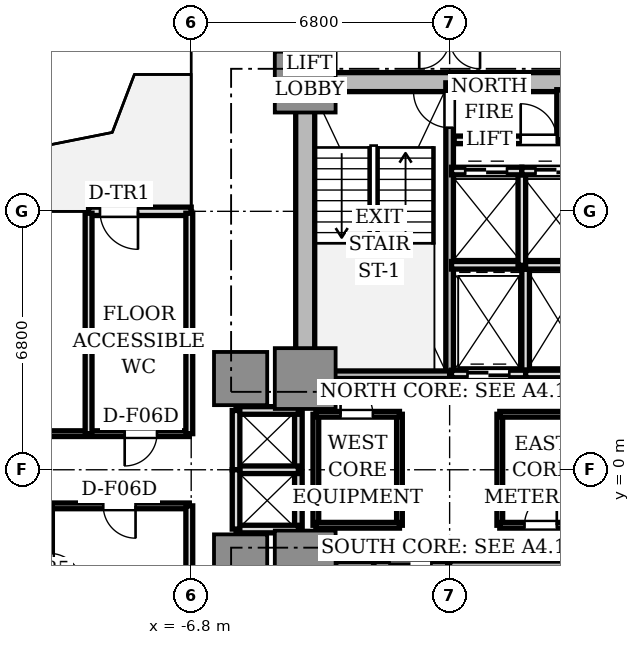
"""IFC4 building model, lengths in metres.
Left out: names, types, materials, properties, quantities, classifications, styles, units other than length and angle.
Written with IfcOpenShell. Run it as: python <this file> out.ifc"""

import sys

from ifc_helpers import new_model, si_unit, direction, frame, frame_2d, origin, origin_2d, place, context, subcontext, project, spatial, rectangle, extrude, source, transform, mapped, element, fill, save


model = new_model("IFC4")
c1 = context("Model", 3, precision=1e-05, world=origin(), true_north=direction((0.0, 1.0)))
c2 = subcontext(c1, "Body", "Model", "MODEL_VIEW")
j1 = project(units=[si_unit("LENGTHUNIT", "METRE"), si_unit("PLANEANGLEUNIT", "RADIAN")], contexts=[c1])
p1 = place(None, origin())
s1 = spatial("IfcSite", under=j1, at=p1, CompositionType="ELEMENT")
p2 = place(p1, origin())
s2 = spatial("IfcBuilding", under=s1, at=p2, CompositionType="ELEMENT")
p3 = place(p2, frame((0.0, 0.0, 33.15)))
s3 = spatial("IfcBuildingStorey", under=s2, at=p3, CompositionType="ELEMENT", Elevation=33.15)
p4 = place(p3, frame((-3.55, 10.2, 0.0), z_axis=(0.0, 0.0, 1.0), x_axis=(1.0, 0.0, 0.0)))
e1 = element("IfcWall", 1, at=p4, inside=s3, PredefinedType="SHEAR", context=c2, shape_type="SweptSolid", body=[
    extrude(rectangle(XDim=7.1, YDim=0.5, at=frame_2d((3.55, 0.0))), origin(), (0.0, 0.0, 1.0), 3.11),
])
p5 = place(p3, frame((-3.8, 2.85, 0.0), z_axis=(0.0, 0.0, 1.0), x_axis=(0.0, 1.0, 0.0)))
e2 = element("IfcWall", 2, at=p5, inside=s3, PredefinedType="SHEAR", context=c2, shape_type="SweptSolid", body=[
    extrude(rectangle(XDim=6.9, YDim=0.5, at=frame_2d((3.45, 0.0))), origin(), (0.0, 0.0, 1.0), 3.11),
])
m1 = source(origin(), c2, "Body", "SweptSolid", [
    extrude(rectangle(XDim=1.6, YDim=1.6, at=origin_2d()), origin(), (0.0, 0.0, 1.0), 3.11),
])
for number, where, z_axis, x_axis in (
    (3, (-3.8, 2.4, 0.0), (0.0, 0.0, 1.0), (1.0, 0.0, 0.0)),
    (4, (-3.8, 10.2, 0.0), (0.0, 0.0, 1.0), (1.0, 0.0, 0.0)),
    (5, (-3.8, -2.4, 0.0), (0.0, 0.0, 1.0), (1.0, 0.0, 0.0)),
):
    element("IfcColumn", number, at=place(p3, frame(where, z_axis=z_axis, x_axis=x_axis)), inside=s3, PredefinedType="COLUMN", context=c2, shape_type="MappedRepresentation", body=[
        mapped(m1, transform((0.0, 0.0, 0.0), scale=1.0)),
    ])
m2 = source(origin(), c2, "Body", "SweptSolid", [
    extrude(rectangle(XDim=1.4, YDim=1.4, at=origin_2d()), origin(), (0.0, 0.0, 1.0), 3.11),
])
for number, where, z_axis, x_axis in (
    (6, (-5.5, 2.4, 0.0), (0.0, 0.0, 1.0), (1.0, 0.0, 0.0)),
    (7, (-5.5, -2.4, 0.0), (0.0, 0.0, 1.0), (1.0, 0.0, 0.0)),
):
    element("IfcColumn", number, at=place(p3, frame(where, z_axis=z_axis, x_axis=x_axis)), inside=s3, PredefinedType="COLUMN", context=c2, shape_type="MappedRepresentation", body=[
        mapped(m2, transform((0.0, 0.0, 0.0), scale=1.0)),
    ])
p6 = place(p3, frame((-6.8, 6.8, 0.0), z_axis=(0.0, 0.0, 1.0), x_axis=(-1.0, 0.0, 0.0)))
e8 = element("IfcWall", 8, at=p6, inside=s3, PredefinedType="STANDARD", context=c2, shape_type="SweptSolid", body=[
    extrude(rectangle(XDim=2.7, YDim=0.22, at=frame_2d((1.35, 0.0))), origin(), (0.0, 0.0, 1.0), 3.11),
])
p7 = place(p6, frame((1.4, 0.0, 0.0)))
e9 = element("IfcOpeningElement", 9, at=p7, cuts=e8, PredefinedType="OPENING", context=c2, shape_type="SweptSolid", body=[
    extrude(rectangle(XDim=1.0, YDim=2.2, at=frame_2d((0.5, 1.1))), frame((0.0, 0.12, 0.0), z_axis=(0.0, -1.0, 0.0), x_axis=(1.0, 0.0, 0.0)), (0.0, 0.0, 1.0), 0.24),
])
p8 = place(p3, frame((0.0, 2.5, 0.0), z_axis=(0.0, 0.0, 1.0), x_axis=(0.0, 1.0, 0.0)))
e10 = element("IfcWall", 10, at=p8, inside=s3, PredefinedType="SOLIDWALL", context=c2, shape_type="SweptSolid", body=[
    extrude(rectangle(XDim=7.68, YDim=0.2, at=frame_2d((3.84, 0.0))), origin(), (0.0, 0.0, 1.0), 3.11),
])
p9 = place(p8, frame((6.5, 0.0, 0.0)))
e11 = element("IfcOpeningElement", 11, at=p9, cuts=e10, PredefinedType="OPENING", context=c2, shape_type="SweptSolid", body=[
    extrude(rectangle(XDim=0.95, YDim=2.15, at=frame_2d((0.475, 1.075))), frame((0.0, 0.11, 0.0), z_axis=(0.0, -1.0, 0.0), x_axis=(1.0, 0.0, 0.0)), (0.0, 0.0, 1.0), 0.22),
])
p10 = place(p3, frame((-3.72, 2.5, 0.0), z_axis=(0.0, 0.0, 1.0), x_axis=(1.0, 0.0, 0.0)))
e12 = element("IfcWall", 12, at=p10, inside=s3, PredefinedType="SOLIDWALL", context=c2, shape_type="SweptSolid", body=[
    extrude(rectangle(XDim=3.72, YDim=0.2, at=frame_2d((1.86, 0.0))), origin(), (0.0, 0.0, 1.0), 3.11),
])
p11 = place(p3, frame((0.0, -10.18, 0.0), z_axis=(0.0, 0.0, 1.0), x_axis=(0.0, 1.0, 0.0)))
e13 = element("IfcWall", 13, at=p11, inside=s3, PredefinedType="SOLIDWALL", context=c2, shape_type="SweptSolid", body=[
    extrude(rectangle(XDim=7.68, YDim=0.2, at=frame_2d((3.84, 0.0))), origin(), (0.0, 0.0, 1.0), 3.11),
])
p12 = place(p11, frame((0.28, 0.0, 0.0)))
e14 = element("IfcOpeningElement", 14, at=p12, cuts=e13, PredefinedType="OPENING", context=c2, shape_type="SweptSolid", body=[
    extrude(rectangle(XDim=1.1, YDim=2.15, at=frame_2d((0.55, 1.075))), frame((0.0, 0.11, 0.0), z_axis=(0.0, -1.0, 0.0), x_axis=(1.0, 0.0, 0.0)), (0.0, 0.0, 1.0), 0.22),
])
p13 = place(p3, frame((0.0, -2.5, 0.0), z_axis=(0.0, 0.0, 1.0), x_axis=(1.0, 0.0, 0.0)))
e15 = element("IfcWall", 15, at=p13, inside=s3, PredefinedType="SOLIDWALL", context=c2, shape_type="SweptSolid", body=[
    extrude(rectangle(XDim=3.72, YDim=0.2, at=frame_2d((1.86, 0.0))), origin(), (0.0, 0.0, 1.0), 3.11),
])
p14 = place(p3, frame((2.0, 2.5, 0.0), z_axis=(0.0, 0.0, 1.0), x_axis=(0.0, 1.0, 0.0)))
e16 = element("IfcWall", 16, at=p14, inside=s3, PredefinedType="SOLIDWALL", context=c2, shape_type="SweptSolid", body=[
    extrude(rectangle(XDim=2.78, YDim=0.2, at=frame_2d((1.39, 0.0))), origin(), (0.0, 0.0, 1.0), 2.66),
])
p15 = place(p3, frame((0.05, 2.52, 0.0), z_axis=(0.0, 0.0, 1.0), x_axis=(1.0, 0.0, 0.0)))
e17 = element("IfcWall", 17, at=p15, inside=s3, PredefinedType="SOLIDWALL", context=c2, shape_type="SweptSolid", body=[
    extrude(rectangle(XDim=1.95, YDim=0.2, at=frame_2d((0.975, 0.0))), origin(), (0.0, 0.0, 1.0), 2.66),
])
p16 = place(p15, frame((0.42, 0.0, 0.0)))
e18 = element("IfcOpeningElement", 18, at=p16, cuts=e17, PredefinedType="OPENING", context=c2, shape_type="SweptSolid", body=[
    extrude(rectangle(XDim=1.1, YDim=2.2, at=frame_2d((0.55, 1.1))), frame((0.0, 0.11, 0.0), z_axis=(0.0, -1.0, 0.0), x_axis=(1.0, 0.0, 0.0)), (0.0, 0.0, 1.0), 0.22),
])
p17 = place(p3, frame((-2.0, -5.28, 0.0), z_axis=(0.0, 0.0, 1.0), x_axis=(0.0, 1.0, 0.0)))
e19 = element("IfcWall", 19, at=p17, inside=s3, PredefinedType="SOLIDWALL", context=c2, shape_type="SweptSolid", body=[
    extrude(rectangle(XDim=2.78, YDim=0.2, at=frame_2d((1.39, 0.0))), origin(), (0.0, 0.0, 1.0), 2.66),
])
p18 = place(p3, frame((-2.0, -2.52, 0.0), z_axis=(0.0, 0.0, 1.0), x_axis=(1.0, 0.0, 0.0)))
e20 = element("IfcWall", 20, at=p18, inside=s3, PredefinedType="SOLIDWALL", context=c2, shape_type="SweptSolid", body=[
    extrude(rectangle(XDim=1.95, YDim=0.2, at=frame_2d((0.975, 0.0))), origin(), (0.0, 0.0, 1.0), 2.66),
])
p19 = place(p18, frame((0.42, 0.0, 0.0)))
e21 = element("IfcOpeningElement", 21, at=p19, cuts=e20, PredefinedType="OPENING", context=c2, shape_type="SweptSolid", body=[
    extrude(rectangle(XDim=1.1, YDim=2.2, at=frame_2d((0.55, 1.1))), frame((0.0, 0.11, 0.0), z_axis=(0.0, -1.0, 0.0), x_axis=(1.0, 0.0, 0.0)), (0.0, 0.0, 1.0), 0.22),
])
for number, where, z_axis, x_axis in (
    (22, (2.0, 2.52, 0.0), (0.0, 0.0, 1.0), (1.0, 0.0, 0.0)),
    (23, (-3.0, -2.52, 0.0), (0.0, 0.0, 1.0), (1.0, 0.0, 0.0)),
):
    element("IfcWall", number, at=place(p3, frame(where, z_axis=z_axis, x_axis=x_axis)), inside=s3, PredefinedType="SOLIDWALL", context=c2, shape_type="SweptSolid", body=[
        extrude(rectangle(XDim=1.0, YDim=0.2, at=frame_2d((0.5, 0.0))), origin(), (0.0, 0.0, 1.0), 2.66),
    ])
p20 = place(p3, frame((0.05, 5.38, 0.0), z_axis=(0.0, 0.0, 1.0), x_axis=(1.0, 0.0, 0.0)))
e24 = element("IfcWall", 24, at=p20, inside=s3, PredefinedType="SOLIDWALL", context=c2, shape_type="SweptSolid", body=[
    extrude(rectangle(XDim=3.69, YDim=0.2, at=frame_2d((1.845, 0.0))), origin(), (0.0, 0.0, 1.0), 2.66),
])
p21 = place(p3, frame((1.9, 5.38, 0.0), z_axis=(0.0, 0.0, 1.0), x_axis=(0.0, 1.0, 0.0)))
e25 = element("IfcWall", 25, at=p21, inside=s3, PredefinedType="SOLIDWALL", context=c2, shape_type="SweptSolid", body=[
    extrude(rectangle(XDim=2.48, YDim=0.2, at=frame_2d((1.24, 0.0))), origin(), (0.0, 0.0, 1.0), 2.66),
])
p22 = place(p3, frame((0.05, 7.86, 0.0), z_axis=(0.0, 0.0, 1.0), x_axis=(1.0, 0.0, 0.0)))
e26 = element("IfcWall", 26, at=p22, inside=s3, PredefinedType="SOLIDWALL", context=c2, shape_type="SweptSolid", body=[
    extrude(rectangle(XDim=1.85, YDim=0.2, at=frame_2d((0.925, 0.0))), origin(), (0.0, 0.0, 1.0), 2.66),
])
p23 = place(p22, frame((0.36, 0.0, 0.0)))
e27 = element("IfcOpeningElement", 27, at=p23, cuts=e26, PredefinedType="OPENING", context=c2, shape_type="SweptSolid", body=[
    extrude(rectangle(XDim=1.1, YDim=2.2, at=frame_2d((0.55, 1.1))), frame((0.0, 0.11, 0.0), z_axis=(0.0, -1.0, 0.0), x_axis=(1.0, 0.0, 0.0)), (0.0, 0.0, 1.0), 0.22),
])
p24 = place(p3, frame((1.9, 7.86, 0.0), z_axis=(0.0, 0.0, 1.0), x_axis=(1.0, 0.0, 0.0)))
e28 = element("IfcWall", 28, at=p24, inside=s3, PredefinedType="SOLIDWALL", context=c2, shape_type="SweptSolid", body=[
    extrude(rectangle(XDim=1.84, YDim=0.2, at=frame_2d((0.92, 0.0))), origin(), (0.0, 0.0, 1.0), 2.66),
])
p25 = place(p24, frame((0.36, 0.0, 0.0)))
e29 = element("IfcOpeningElement", 29, at=p25, cuts=e28, PredefinedType="OPENING", context=c2, shape_type="SweptSolid", body=[
    extrude(rectangle(XDim=1.1, YDim=2.2, at=frame_2d((0.55, 1.1))), frame((0.0, 0.11, 0.0), z_axis=(0.0, -1.0, 0.0), x_axis=(1.0, 0.0, 0.0)), (0.0, 0.0, 1.0), 0.22),
])
p26 = place(p3, frame((-3.98, -1.56, 0.0), z_axis=(0.0, 0.0, 1.0), x_axis=(0.0, 1.0, 0.0)))
e30 = element("IfcWall", 30, at=p26, inside=s3, PredefinedType="SOLIDWALL", context=c2, shape_type="SweptSolid", body=[
    extrude(rectangle(XDim=3.12, YDim=0.2, at=frame_2d((1.56, 0.0))), origin(), (0.0, 0.0, 1.0), 2.18),
])
for number, where, z_axis, x_axis in (
    (31, (-5.62, 1.56, 0.0), (0.0, 0.0, 1.0), (1.0, 0.0, 0.0)),
    (32, (-5.62, -1.56, 0.0), (0.0, 0.0, 1.0), (1.0, 0.0, 0.0)),
    (33, (-5.62, 0.0, 0.0), (0.0, 0.0, 1.0), (1.0, 0.0, 0.0)),
):
    element("IfcWall", number, at=place(p3, frame(where, z_axis=z_axis, x_axis=x_axis)), inside=s3, PredefinedType="SOLIDWALL", context=c2, shape_type="SweptSolid", body=[
        extrude(rectangle(XDim=1.64, YDim=0.2, at=frame_2d((0.82, 0.0))), origin(), (0.0, 0.0, 1.0), 2.66),
    ])
for number, where, z_axis, x_axis in (
    (34, (-5.62, 0.0, 0.0), (0.0, 0.0, 1.0), (0.0, 1.0, 0.0)),
    (35, (-5.62, -1.56, 0.0), (0.0, 0.0, 1.0), (0.0, 1.0, 0.0)),
):
    element("IfcWall", number, at=place(p3, frame(where, z_axis=z_axis, x_axis=x_axis)), inside=s3, PredefinedType="SOLIDWALL", context=c2, shape_type="SweptSolid", body=[
        extrude(rectangle(XDim=1.56, YDim=0.2, at=frame_2d((0.78, 0.0))), origin(), (0.0, 0.0, 1.0), 2.66),
    ])
p27 = place(p3, frame((0.12, 8.68, 0.0), z_axis=(0.0, 0.0, 1.0), x_axis=(1.0, 0.0, 0.0)))
e36 = element("IfcWall", 36, at=p27, inside=s3, PredefinedType="SOLIDWALL", context=c2, shape_type="SweptSolid", body=[
    extrude(rectangle(XDim=3.62, YDim=0.2, at=frame_2d((1.81, 0.0))), origin(), (0.0, 0.0, 1.0), 2.66),
])
p28 = place(p27, frame((1.75, 0.0, 0.0)))
e37 = element("IfcOpeningElement", 37, at=p28, cuts=e36, PredefinedType="OPENING", context=c2, shape_type="SweptSolid", body=[
    extrude(rectangle(XDim=0.95, YDim=2.15, at=frame_2d((0.475, 1.075))), frame((0.0, 0.11, 0.0), z_axis=(0.0, -1.0, 0.0), x_axis=(1.0, 0.0, 0.0)), (0.0, 0.0, 1.0), 0.22),
])
p29 = place(p3, frame((2.92, 8.68, 0.0), z_axis=(0.0, 0.0, 1.0), x_axis=(0.0, 1.0, 0.0)))
e38 = element("IfcWall", 38, at=p29, inside=s3, PredefinedType="SOLIDWALL", context=c2, shape_type="SweptSolid", body=[
    extrude(rectangle(XDim=1.32, YDim=0.2, at=frame_2d((0.66, 0.0))), origin(), (0.0, 0.0, 1.0), 2.66),
])
p30 = place(p3, frame((-1.32, -1.46, 0.0), z_axis=(0.0, 0.0, 1.0), x_axis=(0.0, 1.0, 0.0)))
e39 = element("IfcWall", 39, at=p30, inside=s3, PredefinedType="PARTITIONING", context=c2, shape_type="SweptSolid", body=[
    extrude(rectangle(XDim=2.92, YDim=0.15, at=frame_2d((1.46, 0.0))), origin(), (0.0, 0.0, 1.0), 2.66),
])
p31 = place(p3, frame((-3.52, -1.46, 0.0), z_axis=(0.0, 0.0, 1.0), x_axis=(0.0, 1.0, 0.0)))
e40 = element("IfcWall", 40, at=p31, inside=s3, PredefinedType="PARTITIONING", context=c2, shape_type="SweptSolid", body=[
    extrude(rectangle(XDim=2.92, YDim=0.15, at=frame_2d((1.46, 0.0))), origin(), (0.0, 0.0, 1.0), 2.18),
])
p32 = place(p3, frame((-3.52, 1.46, 0.0), z_axis=(0.0, 0.0, 1.0), x_axis=(1.0, 0.0, 0.0)))
e41 = element("IfcWall", 41, at=p32, inside=s3, PredefinedType="PARTITIONING", context=c2, shape_type="SweptSolid", body=[
    extrude(rectangle(XDim=2.2, YDim=0.15, at=frame_2d((1.1, 0.0))), origin(), (0.0, 0.0, 1.0), 2.66),
])
p33 = place(p32, frame((0.65, 0.0, 0.0)))
e42 = element("IfcOpeningElement", 42, at=p33, cuts=e41, PredefinedType="OPENING", context=c2, shape_type="SweptSolid", body=[
    extrude(rectangle(XDim=0.85, YDim=2.1, at=frame_2d((0.425, 1.05))), frame((0.0, 0.085, 0.0), z_axis=(0.0, -1.0, 0.0), x_axis=(1.0, 0.0, 0.0)), (0.0, 0.0, 1.0), 0.17),
])
p34 = place(p3, frame((-3.52, -1.46, 0.0), z_axis=(0.0, 0.0, 1.0), x_axis=(1.0, 0.0, 0.0)))
e43 = element("IfcWall", 43, at=p34, inside=s3, PredefinedType="PARTITIONING", context=c2, shape_type="SweptSolid", body=[
    extrude(rectangle(XDim=2.2, YDim=0.15, at=frame_2d((1.1, 0.0))), origin(), (0.0, 0.0, 1.0), 2.66),
])
p35 = place(p3, frame((1.32, -1.46, 0.0), z_axis=(0.0, 0.0, 1.0), x_axis=(0.0, 1.0, 0.0)))
e44 = element("IfcWall", 44, at=p35, inside=s3, PredefinedType="PARTITIONING", context=c2, shape_type="SweptSolid", body=[
    extrude(rectangle(XDim=2.92, YDim=0.15, at=frame_2d((1.46, 0.0))), origin(), (0.0, 0.0, 1.0), 2.66),
])
p36 = place(p3, frame((1.32, 1.46, 0.0), z_axis=(0.0, 0.0, 1.0), x_axis=(1.0, 0.0, 0.0)))
e45 = element("IfcWall", 45, at=p36, inside=s3, PredefinedType="PARTITIONING", context=c2, shape_type="SweptSolid", body=[
    extrude(rectangle(XDim=2.2, YDim=0.15, at=frame_2d((1.1, 0.0))), origin(), (0.0, 0.0, 1.0), 2.66),
])
p37 = place(p3, frame((1.32, -1.46, 0.0), z_axis=(0.0, 0.0, 1.0), x_axis=(1.0, 0.0, 0.0)))
e46 = element("IfcWall", 46, at=p37, inside=s3, PredefinedType="PARTITIONING", context=c2, shape_type="SweptSolid", body=[
    extrude(rectangle(XDim=2.2, YDim=0.15, at=frame_2d((1.1, 0.0))), origin(), (0.0, 0.0, 1.0), 2.66),
])
p38 = place(p37, frame((0.65, 0.0, 0.0)))
e47 = element("IfcOpeningElement", 47, at=p38, cuts=e46, PredefinedType="OPENING", context=c2, shape_type="SweptSolid", body=[
    extrude(rectangle(XDim=0.85, YDim=2.1, at=frame_2d((0.425, 1.05))), frame((0.0, 0.085, 0.0), z_axis=(0.0, -1.0, 0.0), x_axis=(1.0, 0.0, 0.0)), (0.0, 0.0, 1.0), 0.17),
])
p39 = place(p3, frame((-6.85, -0.95, 0.0), z_axis=(0.0, 0.0, 1.0), x_axis=(-1.0, 0.0, 0.0)))
e48 = element("IfcWall", 48, at=p39, inside=s3, PredefinedType="PARTITIONING", context=c2, shape_type="SweptSolid", body=[
    extrude(rectangle(XDim=17.9, YDim=0.15, at=frame_2d((8.95, 0.0))), origin(), (0.0, 0.0, 1.0), 2.66),
])
p40 = place(p39, frame((1.414, 0.0, 0.0)))
e49 = element("IfcOpeningElement", 49, at=p40, cuts=e48, PredefinedType="OPENING", context=c2, shape_type="SweptSolid", body=[
    extrude(rectangle(XDim=0.85, YDim=2.1, at=frame_2d((0.425, 1.05))), frame((0.0, 0.085, 0.0), z_axis=(0.0, -1.0, 0.0), x_axis=(1.0, 0.0, 0.0)), (0.0, 0.0, 1.0), 0.17),
])
p41 = place(p39, frame((7.231, 0.0, 0.0)))
e50 = element("IfcOpeningElement", 50, at=p41, cuts=e48, PredefinedType="OPENING", context=c2, shape_type="SweptSolid", body=[
    extrude(rectangle(XDim=0.85, YDim=2.1, at=frame_2d((0.425, 1.05))), frame((0.0, 0.085, 0.0), z_axis=(0.0, -1.0, 0.0), x_axis=(1.0, 0.0, 0.0)), (0.0, 0.0, 1.0), 0.17),
])
p42 = place(p39, frame((13.278, 0.0, 0.0)))
e51 = element("IfcOpeningElement", 51, at=p42, cuts=e48, PredefinedType="OPENING", context=c2, shape_type="SweptSolid", body=[
    extrude(rectangle(XDim=0.85, YDim=2.1, at=frame_2d((0.425, 1.05))), frame((0.0, 0.085, 0.0), z_axis=(0.0, -1.0, 0.0), x_axis=(1.0, 0.0, 0.0)), (0.0, 0.0, 1.0), 0.17),
])
p43 = place(p3, frame((-6.85, 0.95, 0.0), z_axis=(0.0, 0.0, 1.0), x_axis=(-1.0, 0.0, 0.0)))
e52 = element("IfcWall", 52, at=p43, inside=s3, PredefinedType="PARTITIONING", context=c2, shape_type="SweptSolid", body=[
    extrude(rectangle(XDim=17.9, YDim=0.15, at=frame_2d((8.95, 0.0))), origin(), (0.0, 0.0, 1.0), 2.66),
])
p44 = place(p43, frame((0.85, 0.0, 0.0)))
e53 = element("IfcOpeningElement", 53, at=p44, cuts=e52, PredefinedType="OPENING", context=c2, shape_type="SweptSolid", body=[
    extrude(rectangle(XDim=0.85, YDim=2.1, at=frame_2d((0.425, 1.05))), frame((0.0, 0.085, 0.0), z_axis=(0.0, -1.0, 0.0), x_axis=(1.0, 0.0, 0.0)), (0.0, 0.0, 1.0), 0.17),
])
p45 = place(p43, frame((8.575, 0.0, 0.0)))
e54 = element("IfcOpeningElement", 54, at=p45, cuts=e52, PredefinedType="OPENING", context=c2, shape_type="SweptSolid", body=[
    extrude(rectangle(XDim=0.85, YDim=2.1, at=frame_2d((0.425, 1.05))), frame((0.0, 0.085, 0.0), z_axis=(0.0, -1.0, 0.0), x_axis=(1.0, 0.0, 0.0)), (0.0, 0.0, 1.0), 0.17),
])
for number, where, z_axis, x_axis in (
    (55, (-6.85, -0.95, 0.0), (0.0, 0.0, 1.0), (0.0, -1.0, 0.0)),
    (56, (-6.85, 6.75, 0.0), (0.0, 0.0, 1.0), (0.0, -1.0, 0.0)),
    (57, (-9.5, 0.95, 0.0), (0.0, 0.0, 1.0), (0.0, 1.0, 0.0)),
):
    element("IfcWall", number, at=place(p3, frame(where, z_axis=z_axis, x_axis=x_axis)), inside=s3, PredefinedType="PARTITIONING", context=c2, shape_type="SweptSolid", body=[
        extrude(rectangle(XDim=5.8, YDim=0.18, at=frame_2d((2.9, 0.0))), origin(), (0.0, 0.0, 1.0), 2.66),
    ])
m3 = source(origin(), c2, "Body", "SweptSolid", [
    extrude(rectangle(XDim=1.0, YDim=0.05, at=origin_2d()), origin(), (0.0, 0.0, 1.0), 2.2),
])
p46 = place(p7, frame((0.5, 0.0, 0.0)))
e58 = element("IfcDoor", 58, at=p46, inside=s3, OperationType="SINGLE_SWING_LEFT", PredefinedType="DOOR", context=c2, shape_type="MappedRepresentation", body=[
    mapped(m3, transform((0.0, 0.0, 0.0), scale=1.0)),
])
fill(e9, e58)
m4 = source(origin(), c2, "Body", "SweptSolid", [
    extrude(rectangle(XDim=1.1, YDim=0.05, at=origin_2d()), origin(), (0.0, 0.0, 1.0), 2.2),
])
p47 = place(p16, frame((0.55, 0.0, 0.0)))
e59 = element("IfcDoor", 59, at=p47, inside=s3, OperationType="DOUBLE_DOOR_SLIDING", PredefinedType="DOOR", context=c2, shape_type="MappedRepresentation", body=[
    mapped(m4, transform((0.0, 0.0, 0.0), scale=1.0)),
])
fill(e18, e59)
p48 = place(p19, frame((0.55, 0.0, 0.0)))
e60 = element("IfcDoor", 60, at=p48, inside=s3, OperationType="DOUBLE_DOOR_SLIDING", PredefinedType="DOOR", context=c2, shape_type="MappedRepresentation", body=[
    mapped(m4, transform((0.0, 0.0, 0.0), scale=1.0)),
])
fill(e21, e60)
p49 = place(p23, frame((0.55, 0.0, 0.0)))
e61 = element("IfcDoor", 61, at=p49, inside=s3, OperationType="DOUBLE_DOOR_SLIDING", PredefinedType="DOOR", context=c2, shape_type="MappedRepresentation", body=[
    mapped(m4, transform((0.0, 0.0, 0.0), scale=1.0)),
])
fill(e27, e61)
p50 = place(p25, frame((0.55, 0.0, 0.0)))
e62 = element("IfcDoor", 62, at=p50, inside=s3, OperationType="DOUBLE_DOOR_SLIDING", PredefinedType="DOOR", context=c2, shape_type="MappedRepresentation", body=[
    mapped(m4, transform((0.0, 0.0, 0.0), scale=1.0)),
])
fill(e29, e62)
m5 = source(origin(), c2, "Body", "SweptSolid", [
    extrude(rectangle(XDim=0.95, YDim=0.05, at=origin_2d()), origin(), (0.0, 0.0, 1.0), 2.15),
])
p51 = place(p9, frame((0.475, 0.0, 0.0)))
e63 = element("IfcDoor", 63, at=p51, inside=s3, OperationType="SINGLE_SWING_RIGHT", PredefinedType="DOOR", context=c2, shape_type="MappedRepresentation", body=[
    mapped(m5, transform((0.0, 0.0, 0.0), scale=1.0)),
])
fill(e11, e63)
p52 = place(p28, frame((0.475, 0.0, 0.0)))
e64 = element("IfcDoor", 64, at=p52, inside=s3, OperationType="SINGLE_SWING_LEFT", PredefinedType="DOOR", context=c2, shape_type="MappedRepresentation", body=[
    mapped(m5, transform((0.0, 0.0, 0.0), scale=1.0)),
])
fill(e37, e64)
m6 = source(origin(), c2, "Body", "SweptSolid", [
    extrude(rectangle(XDim=0.85, YDim=0.05, at=origin_2d()), origin(), (0.0, 0.0, 1.0), 2.1),
])
p53 = place(p33, frame((0.425, 0.0, 0.0)))
e65 = element("IfcDoor", 65, at=p53, inside=s3, OperationType="SINGLE_SWING_LEFT", PredefinedType="DOOR", context=c2, shape_type="MappedRepresentation", body=[
    mapped(m6, transform((0.0, 0.0, 0.0), scale=1.0)),
])
fill(e42, e65)
p54 = place(p38, frame((0.425, 0.0, 0.0)))
e66 = element("IfcDoor", 66, at=p54, inside=s3, OperationType="SINGLE_SWING_RIGHT", PredefinedType="DOOR", context=c2, shape_type="MappedRepresentation", body=[
    mapped(m6, transform((0.0, 0.0, 0.0), scale=1.0)),
])
fill(e47, e66)
p55 = place(p40, frame((0.425, 0.0, 0.0)))
e67 = element("IfcDoor", 67, at=p55, inside=s3, OperationType="SINGLE_SWING_LEFT", PredefinedType="DOOR", context=c2, shape_type="MappedRepresentation", body=[
    mapped(m6, transform((0.0, 0.0, 0.0), scale=1.0)),
])
fill(e49, e67)
p56 = place(p44, frame((0.425, 0.0, 0.0)))
e68 = element("IfcDoor", 68, at=p56, inside=s3, OperationType="SINGLE_SWING_RIGHT", PredefinedType="DOOR", context=c2, shape_type="MappedRepresentation", body=[
    mapped(m6, transform((0.0, 0.0, 0.0), scale=1.0)),
])
fill(e53, e68)
save(model, sys.argv[1])
